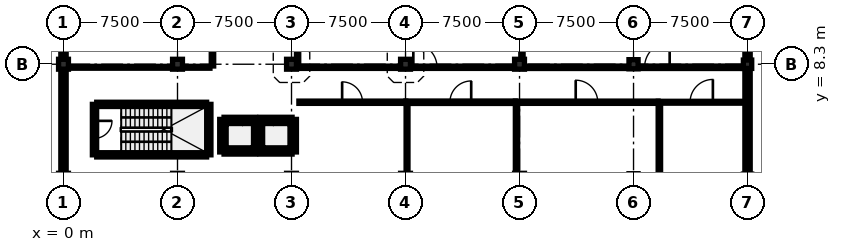
"""IFC4 building model, lengths in metres.
Left out: names, types, materials, properties, quantities, classifications, styles, units other than length and angle.
Written with IfcOpenShell. Run it as: python <this file> out.ifc"""

import sys

from ifc_helpers import new_model, si_unit, direction, frame, frame_2d, origin, origin_2d, place, context, subcontext, project, spatial, rectangle, extrude, element, fill, save


model = new_model("IFC4")
c1 = context("Model", 3, precision=1e-05, world=origin(), true_north=direction((0.0, 1.0)))
c2 = subcontext(c1, "Body", "Model", "MODEL_VIEW")
j1 = project(units=[si_unit("LENGTHUNIT", "METRE"), si_unit("PLANEANGLEUNIT", "RADIAN")], contexts=[c1])
p1 = place(None, origin())
s1 = spatial("IfcSite", under=j1, at=p1, CompositionType="ELEMENT")
p2 = place(p1, origin())
s2 = spatial("IfcBuilding", under=s1, at=p2, CompositionType="ELEMENT")
p3 = place(p2, frame((0.0, 0.0, 9.5)))
s3 = spatial("IfcBuildingStorey", under=s2, at=p3, CompositionType="ELEMENT", Elevation=9.5)
for number, where, z_axis, x_axis in (
    (1, (0.0, 8.3, 0.0), (0.0, 0.0, 1.0), (1.0, 0.0, 0.0)),
    (2, (7.5, 8.3, 0.0), (0.0, 0.0, 1.0), (1.0, 0.0, 0.0)),
    (3, (15.0, 8.3, 0.0), (0.0, 0.0, 1.0), (1.0, 0.0, 0.0)),
    (4, (22.5, 8.3, 0.0), (0.0, 0.0, 1.0), (1.0, 0.0, 0.0)),
    (5, (30.0, 8.3, 0.0), (0.0, 0.0, 1.0), (1.0, 0.0, 0.0)),
):
    element("IfcColumn", number, at=place(p3, frame(where, z_axis=z_axis, x_axis=x_axis)), inside=s3, PredefinedType="COLUMN", context=c2, shape_type="SweptSolid", body=[
        extrude(rectangle(XDim=0.65, YDim=0.65, at=origin_2d()), origin(), (0.0, 0.0, 1.0), 3.7),
    ])
p4 = place(p3, frame((37.5, 8.3, 0.0), z_axis=(0.0, 0.0, 1.0), x_axis=(1.0, 0.0, 0.0)))
e6 = element("IfcColumn", 6, at=p4, inside=s3, PredefinedType="COLUMN", context=c2, shape_type="SweptSolid", body=[
    extrude(rectangle(XDim=0.6, YDim=0.6, at=origin_2d()), origin(), (0.0, 0.0, 1.0), 3.7),
])
p5 = place(p3, frame((45.0, 8.3, 0.0), z_axis=(0.0, 0.0, 1.0), x_axis=(1.0, 0.0, 0.0)))
e7 = element("IfcColumn", 7, at=p5, inside=s3, PredefinedType="COLUMN", context=c2, shape_type="SweptSolid", body=[
    extrude(rectangle(XDim=0.55, YDim=0.55, at=origin_2d()), origin(), (0.0, 0.0, 1.0), 3.75),
])
p6 = place(p3, frame((45.0, 30.525, 0.0), z_axis=(0.0, 0.0, 1.0), x_axis=(0.0, -1.0, 0.0)))
e8 = element("IfcWall", 8, at=p6, inside=s3, PredefinedType="SOLIDWALL", context=c2, shape_type="SweptSolid", body=[
    extrude(rectangle(XDim=21.95, YDim=0.35, at=frame_2d((10.975, 0.0))), origin(), (0.0, 0.0, 1.0), 2.985),
])
p7 = place(p3, frame((45.0, 8.025, 0.0), z_axis=(0.0, 0.0, 1.0), x_axis=(0.0, -1.0, 0.0)))
e9 = element("IfcWall", 9, at=p7, inside=s3, PredefinedType="SOLIDWALL", context=c2, shape_type="SweptSolid", body=[
    extrude(rectangle(XDim=6.95, YDim=0.35, at=frame_2d((3.475, 0.0))), origin(), (0.0, 0.0, 1.0), 2.985),
])
p8 = place(p3, frame((0.0, 1.125, 0.0), z_axis=(0.0, 0.0, 1.0), x_axis=(0.0, 1.0, 0.0)))
e10 = element("IfcWall", 10, at=p8, inside=s3, PredefinedType="SOLIDWALL", context=c2, shape_type="SweptSolid", body=[
    extrude(rectangle(XDim=6.85, YDim=0.35, at=frame_2d((3.425, 0.0))), origin(), (0.0, 0.0, 1.0), 2.985),
])
p9 = place(p3, frame((0.0, 8.625, 0.0), z_axis=(0.0, 0.0, 1.0), x_axis=(0.0, 1.0, 0.0)))
e11 = element("IfcWall", 11, at=p9, inside=s3, PredefinedType="SOLIDWALL", context=c2, shape_type="SweptSolid", body=[
    extrude(rectangle(XDim=6.85, YDim=0.35, at=frame_2d((3.425, 0.0))), origin(), (0.0, 0.0, 1.0), 2.785),
])
p10 = place(p3, frame((2.185, 2.34, 0.0), z_axis=(0.0, 0.0, 1.0), x_axis=(1.0, 0.0, 0.0)))
e12 = element("IfcWall", 12, at=p10, inside=s3, PredefinedType="SHEAR", context=c2, shape_type="SweptSolid", body=[
    extrude(rectangle(XDim=7.23, YDim=0.28, at=frame_2d((3.615, 0.0))), origin(), (0.0, 0.0, 1.0), 3.7),
])
p11 = place(p3, frame((9.56, 2.34, 0.0), z_axis=(0.0, 0.0, 1.0), x_axis=(0.0, 1.0, 0.0)))
e13 = element("IfcWall", 13, at=p11, inside=s3, PredefinedType="SHEAR", context=c2, shape_type="SweptSolid", body=[
    extrude(rectangle(XDim=3.32, YDim=0.28, at=frame_2d((1.66, 0.0))), origin(), (0.0, 0.0, 1.0), 3.7),
])
p12 = place(p3, frame((9.415, 5.66, 0.0), z_axis=(0.0, 0.0, 1.0), x_axis=(-1.0, 0.0, 0.0)))
e14 = element("IfcWall", 14, at=p12, inside=s3, PredefinedType="SHEAR", context=c2, shape_type="SweptSolid", body=[
    extrude(rectangle(XDim=7.23, YDim=0.28, at=frame_2d((3.615, 0.0))), origin(), (0.0, 0.0, 1.0), 3.7),
])
p13 = place(p3, frame((2.04, 5.66, 0.0), z_axis=(0.0, 0.0, 1.0), x_axis=(0.0, -1.0, 0.0)))
e15 = element("IfcWall", 15, at=p13, inside=s3, PredefinedType="SHEAR", context=c2, shape_type="SweptSolid", body=[
    extrude(rectangle(XDim=3.32, YDim=0.28, at=frame_2d((1.66, 0.0))), origin(), (0.0, 0.0, 1.0), 3.7),
])
p14 = place(p13, frame((1.085, 0.0, 0.0)))
e16 = element("IfcOpeningElement", 16, at=p14, cuts=e15, PredefinedType="OPENING", context=c2, shape_type="SweptSolid", body=[
    extrude(rectangle(XDim=1.15, YDim=2.15, at=frame_2d((0.575, 1.075))), frame((0.0, 0.152, 0.0), z_axis=(0.0, -1.0, 0.0), x_axis=(1.0, 0.0, 0.0)), (0.0, 0.0, 1.0), 0.304),
])
p15 = place(p3, frame((10.562, 2.529, 0.0), z_axis=(0.0, 0.0, 1.0), x_axis=(1.0, 0.0, 0.0)))
e17 = element("IfcWall", 17, at=p15, inside=s3, PredefinedType="SHEAR", context=c2, shape_type="SweptSolid", body=[
    extrude(rectangle(XDim=2.077, YDim=0.28, at=frame_2d((1.039, 0.0))), origin(), (0.0, 0.0, 1.0), 3.7),
])
p16 = place(p3, frame((12.783, 2.529, 0.0), z_axis=(0.0, 0.0, 1.0), x_axis=(0.0, 1.0, 0.0)))
e18 = element("IfcWall", 18, at=p16, inside=s3, PredefinedType="SHEAR", context=c2, shape_type="SweptSolid", body=[
    extrude(rectangle(XDim=2.141, YDim=0.28, at=frame_2d((1.071, 0.0))), origin(), (0.0, 0.0, 1.0), 3.7),
])
p17 = place(p3, frame((12.638, 4.671, 0.0), z_axis=(0.0, 0.0, 1.0), x_axis=(-1.0, 0.0, 0.0)))
e19 = element("IfcWall", 19, at=p17, inside=s3, PredefinedType="SHEAR", context=c2, shape_type="SweptSolid", body=[
    extrude(rectangle(XDim=2.077, YDim=0.28, at=frame_2d((1.039, 0.0))), origin(), (0.0, 0.0, 1.0), 3.7),
])
p18 = place(p17, frame((0.489, 0.0, 0.0)))
e20 = element("IfcOpeningElement", 20, at=p18, cuts=e19, PredefinedType="OPENING", context=c2, shape_type="SweptSolid", body=[
    extrude(rectangle(XDim=1.1, YDim=2.15, at=frame_2d((0.55, 1.075))), frame((0.0, 0.152, 0.0), z_axis=(0.0, -1.0, 0.0), x_axis=(1.0, 0.0, 0.0)), (0.0, 0.0, 1.0), 0.304),
])
p19 = place(p3, frame((10.417, 4.671, 0.0), z_axis=(0.0, 0.0, 1.0), x_axis=(0.0, -1.0, 0.0)))
e21 = element("IfcWall", 21, at=p19, inside=s3, PredefinedType="SHEAR", context=c2, shape_type="SweptSolid", body=[
    extrude(rectangle(XDim=2.141, YDim=0.28, at=frame_2d((1.071, 0.0))), origin(), (0.0, 0.0, 1.0), 3.7),
])
p20 = place(p3, frame((12.928, 2.529, 0.0), z_axis=(0.0, 0.0, 1.0), x_axis=(1.0, 0.0, 0.0)))
e22 = element("IfcWall", 22, at=p20, inside=s3, PredefinedType="SHEAR", context=c2, shape_type="SweptSolid", body=[
    extrude(rectangle(XDim=2.11, YDim=0.28, at=frame_2d((1.055, 0.0))), origin(), (0.0, 0.0, 1.0), 3.7),
])
p21 = place(p3, frame((15.184, 2.529, 0.0), z_axis=(0.0, 0.0, 1.0), x_axis=(0.0, 1.0, 0.0)))
e23 = element("IfcWall", 23, at=p21, inside=s3, PredefinedType="SHEAR", context=c2, shape_type="SweptSolid", body=[
    extrude(rectangle(XDim=2.141, YDim=0.28, at=frame_2d((1.071, 0.0))), origin(), (0.0, 0.0, 1.0), 3.7),
])
p22 = place(p3, frame((15.039, 4.671, 0.0), z_axis=(0.0, 0.0, 1.0), x_axis=(-1.0, 0.0, 0.0)))
e24 = element("IfcWall", 24, at=p22, inside=s3, PredefinedType="SHEAR", context=c2, shape_type="SweptSolid", body=[
    extrude(rectangle(XDim=2.11, YDim=0.28, at=frame_2d((1.055, 0.0))), origin(), (0.0, 0.0, 1.0), 3.7),
])
p23 = place(p22, frame((0.505, 0.0, 0.0)))
e25 = element("IfcOpeningElement", 25, at=p23, cuts=e24, PredefinedType="OPENING", context=c2, shape_type="SweptSolid", body=[
    extrude(rectangle(XDim=1.1, YDim=2.15, at=frame_2d((0.55, 1.075))), frame((0.0, 0.152, 0.0), z_axis=(0.0, -1.0, 0.0), x_axis=(1.0, 0.0, 0.0)), (0.0, 0.0, 1.0), 0.304),
])
p24 = place(p3, frame((15.485, 5.8, 0.0), z_axis=(0.0, 0.0, 1.0), x_axis=(1.0, 0.0, 0.0)))
e26 = element("IfcWall", 26, at=p24, inside=s3, PredefinedType="PARTITIONING", context=c2, shape_type="SweptSolid", body=[
    extrude(rectangle(XDim=7.03, YDim=0.15, at=frame_2d((3.515, 0.0))), origin(), (0.0, 0.0, 1.0), 2.785),
])
p25 = place(p24, frame((2.845, 0.0, 0.0)))
e27 = element("IfcOpeningElement", 27, at=p25, cuts=e26, PredefinedType="OPENING", context=c2, shape_type="SweptSolid", body=[
    extrude(rectangle(XDim=1.34, YDim=2.24, at=frame_2d((0.67, 1.12))), frame((0.0, 0.087, 0.0), z_axis=(0.0, -1.0, 0.0), x_axis=(1.0, 0.0, 0.0)), (0.0, 0.0, 1.0), 0.174),
])
p26 = place(p3, frame((22.527, 5.8, 0.0), z_axis=(0.0, 0.0, 1.0), x_axis=(1.0, 0.0, 0.0)))
e28 = element("IfcWall", 28, at=p26, inside=s3, PredefinedType="PARTITIONING", context=c2, shape_type="SweptSolid", body=[
    extrude(rectangle(XDim=7.188, YDim=0.16, at=frame_2d((3.594, 0.0))), origin(), (0.0, 0.0, 1.0), 2.785),
])
p27 = place(p26, frame((2.894, 0.0, 0.0)))
e29 = element("IfcOpeningElement", 29, at=p27, cuts=e28, PredefinedType="OPENING", context=c2, shape_type="SweptSolid", body=[
    extrude(rectangle(XDim=1.4, YDim=2.25, at=frame_2d((0.7, 1.125))), frame((0.0, 0.092, 0.0), z_axis=(0.0, -1.0, 0.0), x_axis=(1.0, 0.0, 0.0)), (0.0, 0.0, 1.0), 0.184),
])
p28 = place(p3, frame((29.727, 5.8, 0.0), z_axis=(0.0, 0.0, 1.0), x_axis=(1.0, 0.0, 0.0)))
e30 = element("IfcWall", 30, at=p28, inside=s3, PredefinedType="PARTITIONING", context=c2, shape_type="SweptSolid", body=[
    extrude(rectangle(XDim=9.388, YDim=0.15, at=frame_2d((4.694, 0.0))), origin(), (0.0, 0.0, 1.0), 2.985),
])
p29 = place(p28, frame((3.969, 0.0, 0.0)))
e31 = element("IfcOpeningElement", 31, at=p29, cuts=e30, PredefinedType="OPENING", context=c2, shape_type="SweptSolid", body=[
    extrude(rectangle(XDim=1.45, YDim=2.26, at=frame_2d((0.725, 1.13))), frame((0.0, 0.087, 0.0), z_axis=(0.0, -1.0, 0.0), x_axis=(1.0, 0.0, 0.0)), (0.0, 0.0, 1.0), 0.174),
])
p30 = place(p3, frame((39.127, 5.8, 0.0), z_axis=(0.0, 0.0, 1.0), x_axis=(1.0, 0.0, 0.0)))
e32 = element("IfcWall", 32, at=p30, inside=s3, PredefinedType="PARTITIONING", context=c2, shape_type="SweptSolid", body=[
    extrude(rectangle(XDim=5.686, YDim=0.125, at=frame_2d((2.843, 0.0))), origin(), (0.0, 0.0, 1.0), 3.085),
])
p31 = place(p30, frame((2.093, 0.0, 0.0)))
e33 = element("IfcOpeningElement", 33, at=p31, cuts=e32, PredefinedType="OPENING", context=c2, shape_type="SweptSolid", body=[
    extrude(rectangle(XDim=1.5, YDim=2.28, at=frame_2d((0.75, 1.14))), frame((0.0, 0.074, 0.0), z_axis=(0.0, -1.0, 0.0), x_axis=(1.0, 0.0, 0.0)), (0.0, 0.0, 1.0), 0.149),
])
p32 = place(p3, frame((15.337, 8.1, 0.0), z_axis=(0.0, 0.0, 1.0), x_axis=(1.0, 0.0, 0.0)))
e34 = element("IfcWall", 34, at=p32, inside=s3, PredefinedType="PARTITIONING", context=c2, shape_type="SweptSolid", body=[
    extrude(rectangle(XDim=14.571, YDim=0.15, at=frame_2d((7.286, 0.0))), origin(), (0.0, 0.0, 1.0), 2.785),
])
p33 = place(p32, frame((7.677, 0.0, 0.0)))
e35 = element("IfcOpeningElement", 35, at=p33, cuts=e34, PredefinedType="OPENING", context=c2, shape_type="SweptSolid", body=[
    extrude(rectangle(XDim=1.56, YDim=2.3, at=frame_2d((0.78, 1.15))), frame((0.0, 0.087, 0.0), z_axis=(0.0, -1.0, 0.0), x_axis=(1.0, 0.0, 0.0)), (0.0, 0.0, 1.0), 0.174),
])
p34 = place(p3, frame((30.337, 8.1, 0.0), z_axis=(0.0, 0.0, 1.0), x_axis=(1.0, 0.0, 0.0)))
e36 = element("IfcWall", 36, at=p34, inside=s3, PredefinedType="PARTITIONING", context=c2, shape_type="SweptSolid", body=[
    extrude(rectangle(XDim=14.376, YDim=0.16, at=frame_2d((7.188, 0.0))), origin(), (0.0, 0.0, 1.0), 2.985),
])
p35 = place(p34, frame((7.89, 0.0, 0.0)))
e37 = element("IfcOpeningElement", 37, at=p35, cuts=e36, PredefinedType="OPENING", context=c2, shape_type="SweptSolid", body=[
    extrude(rectangle(XDim=1.65, YDim=2.32, at=frame_2d((0.825, 1.16))), frame((0.0, 0.092, 0.0), z_axis=(0.0, -1.0, 0.0), x_axis=(1.0, 0.0, 0.0)), (0.0, 0.0, 1.0), 0.184),
])
p36 = place(p3, frame((9.8, 8.185, 0.0), z_axis=(0.0, 0.0, 1.0), x_axis=(0.0, 1.0, 0.0)))
e38 = element("IfcWall", 38, at=p36, inside=s3, PredefinedType="PARTITIONING", context=c2, shape_type="SweptSolid", body=[
    extrude(rectangle(XDim=6.93, YDim=0.16, at=frame_2d((3.465, 0.0))), origin(), (0.0, 0.0, 1.0), 2.785),
])
p37 = place(p36, frame((2.965, 0.0, 0.0)))
e39 = element("IfcOpeningElement", 39, at=p37, cuts=e38, PredefinedType="OPENING", context=c2, shape_type="SweptSolid", body=[
    extrude(rectangle(XDim=1.0, YDim=2.15, at=frame_2d((0.5, 1.075))), frame((0.0, 0.092, 0.0), z_axis=(0.0, -1.0, 0.0), x_axis=(1.0, 0.0, 0.0)), (0.0, 0.0, 1.0), 0.184),
])
p38 = place(p3, frame((22.6, 1.137, 0.0), z_axis=(0.0, 0.0, 1.0), x_axis=(0.0, 1.0, 0.0)))
e40 = element("IfcWall", 40, at=p38, inside=s3, PredefinedType="PARTITIONING", context=c2, shape_type="SweptSolid", body=[
    extrude(rectangle(XDim=4.571, YDim=0.125, at=frame_2d((2.286, 0.0))), origin(), (0.0, 0.0, 1.0), 2.785),
])
p39 = place(p3, frame((29.8, 1.137, 0.0), z_axis=(0.0, 0.0, 1.0), x_axis=(0.0, 1.0, 0.0)))
e41 = element("IfcWall", 41, at=p39, inside=s3, PredefinedType="PARTITIONING", context=c2, shape_type="SweptSolid", body=[
    extrude(rectangle(XDim=4.576, YDim=0.15, at=frame_2d((2.288, 0.0))), origin(), (0.0, 0.0, 1.0), 2.985),
])
p40 = place(p3, frame((39.2, 0.987, 0.0), z_axis=(0.0, 0.0, 1.0), x_axis=(0.0, 1.0, 0.0)))
e42 = element("IfcWall", 42, at=p40, inside=s3, PredefinedType="PARTITIONING", context=c2, shape_type="SweptSolid", body=[
    extrude(rectangle(XDim=4.739, YDim=0.16, at=frame_2d((2.369, 0.0))), origin(), (0.0, 0.0, 1.0), 3.035),
])
p41 = place(p3, frame((15.4, 8.187, 0.0), z_axis=(0.0, 0.0, 1.0), x_axis=(0.0, 1.0, 0.0)))
e43 = element("IfcWall", 43, at=p41, inside=s3, PredefinedType="PARTITIONING", context=c2, shape_type="SweptSolid", body=[
    extrude(rectangle(XDim=5.948, YDim=0.15, at=frame_2d((2.974, 0.0))), origin(), (0.0, 0.0, 1.0), 2.785),
])
p42 = place(p3, frame((30.16, 8.432, 0.0), z_axis=(0.0, 0.0, 1.0), x_axis=(0.0, 1.0, 0.0)))
e44 = element("IfcWall", 44, at=p42, inside=s3, PredefinedType="PARTITIONING", context=c2, shape_type="SweptSolid", body=[
    extrude(rectangle(XDim=5.781, YDim=0.15, at=frame_2d((2.891, 0.0))), origin(), (0.0, 0.0, 1.0), 2.985),
])
p43 = place(p3, frame((0.337, 8.1, 0.0), z_axis=(0.0, 0.0, 1.0), x_axis=(1.0, 0.0, 0.0)))
e45 = element("IfcWall", 45, at=p43, inside=s3, PredefinedType="PARTITIONING", context=c2, shape_type="SweptSolid", body=[
    extrude(rectangle(XDim=9.298, YDim=0.125, at=frame_2d((4.649, 0.0))), origin(), (0.0, 0.0, 1.0), 2.785),
])
p44 = place(p14, origin())
e46 = element("IfcDoor", 46, at=p44, inside=s3, OperationType="SINGLE_SWING_LEFT", PredefinedType="DOOR", context=c2, shape_type="SweptSolid", body=[
    extrude(rectangle(XDim=1.15, YDim=2.15, at=frame_2d((0.575, 1.075))), frame((0.0, 0.025, 0.0), z_axis=(0.0, -1.0, 0.0), x_axis=(1.0, 0.0, 0.0)), (0.0, 0.0, 1.0), 0.05),
])
fill(e16, e46)
p45 = place(p18, origin())
e47 = element("IfcDoor", 47, at=p45, inside=s3, OperationType="SLIDING_TO_LEFT", PredefinedType="DOOR", context=c2, shape_type="SweptSolid", body=[
    extrude(rectangle(XDim=1.1, YDim=2.15, at=frame_2d((0.55, 1.075))), frame((0.0, 0.025, 0.0), z_axis=(0.0, -1.0, 0.0), x_axis=(1.0, 0.0, 0.0)), (0.0, 0.0, 1.0), 0.05),
])
fill(e20, e47)
p46 = place(p23, origin())
e48 = element("IfcDoor", 48, at=p46, inside=s3, OperationType="SLIDING_TO_RIGHT", PredefinedType="DOOR", context=c2, shape_type="SweptSolid", body=[
    extrude(rectangle(XDim=1.1, YDim=2.15, at=frame_2d((0.55, 1.075))), frame((0.0, 0.025, 0.0), z_axis=(0.0, -1.0, 0.0), x_axis=(1.0, 0.0, 0.0)), (0.0, 0.0, 1.0), 0.05),
])
fill(e25, e48)
p47 = place(p25, origin())
e49 = element("IfcDoor", 49, at=p47, inside=s3, OperationType="SINGLE_SWING_LEFT", PredefinedType="DOOR", context=c2, shape_type="SweptSolid", body=[
    extrude(rectangle(XDim=1.34, YDim=2.24, at=frame_2d((0.67, 1.12))), frame((0.0, 0.025, 0.0), z_axis=(0.0, -1.0, 0.0), x_axis=(1.0, 0.0, 0.0)), (0.0, 0.0, 1.0), 0.05),
])
fill(e27, e49)
p48 = place(p27, origin())
e50 = element("IfcDoor", 50, at=p48, inside=s3, OperationType="SINGLE_SWING_RIGHT", PredefinedType="DOOR", context=c2, shape_type="SweptSolid", body=[
    extrude(rectangle(XDim=1.4, YDim=2.25, at=frame_2d((0.7, 1.125))), frame((0.0, 0.025, 0.0), z_axis=(0.0, -1.0, 0.0), x_axis=(1.0, 0.0, 0.0)), (0.0, 0.0, 1.0), 0.05),
])
fill(e29, e50)
p49 = place(p29, origin())
e51 = element("IfcDoor", 51, at=p49, inside=s3, OperationType="SINGLE_SWING_LEFT", PredefinedType="DOOR", context=c2, shape_type="SweptSolid", body=[
    extrude(rectangle(XDim=1.45, YDim=2.26, at=frame_2d((0.725, 1.13))), frame((0.0, 0.025, 0.0), z_axis=(0.0, -1.0, 0.0), x_axis=(1.0, 0.0, 0.0)), (0.0, 0.0, 1.0), 0.05),
])
fill(e31, e51)
p50 = place(p31, origin())
e52 = element("IfcDoor", 52, at=p50, inside=s3, OperationType="SINGLE_SWING_RIGHT", PredefinedType="DOOR", context=c2, shape_type="SweptSolid", body=[
    extrude(rectangle(XDim=1.5, YDim=2.28, at=frame_2d((0.75, 1.14))), frame((0.0, 0.025, 0.0), z_axis=(0.0, -1.0, 0.0), x_axis=(1.0, 0.0, 0.0)), (0.0, 0.0, 1.0), 0.05),
])
fill(e33, e52)
p51 = place(p33, origin())
e53 = element("IfcDoor", 53, at=p51, inside=s3, OperationType="SINGLE_SWING_LEFT", PredefinedType="DOOR", context=c2, shape_type="SweptSolid", body=[
    extrude(rectangle(XDim=1.56, YDim=2.3, at=frame_2d((0.78, 1.15))), frame((0.0, 0.025, 0.0), z_axis=(0.0, -1.0, 0.0), x_axis=(1.0, 0.0, 0.0)), (0.0, 0.0, 1.0), 0.05),
])
fill(e35, e53)
p52 = place(p35, origin())
e54 = element("IfcDoor", 54, at=p52, inside=s3, OperationType="SINGLE_SWING_RIGHT", PredefinedType="DOOR", context=c2, shape_type="SweptSolid", body=[
    extrude(rectangle(XDim=1.65, YDim=2.32, at=frame_2d((0.825, 1.16))), frame((0.0, 0.025, 0.0), z_axis=(0.0, -1.0, 0.0), x_axis=(1.0, 0.0, 0.0)), (0.0, 0.0, 1.0), 0.05),
])
fill(e37, e54)
save(model, sys.argv[1])
